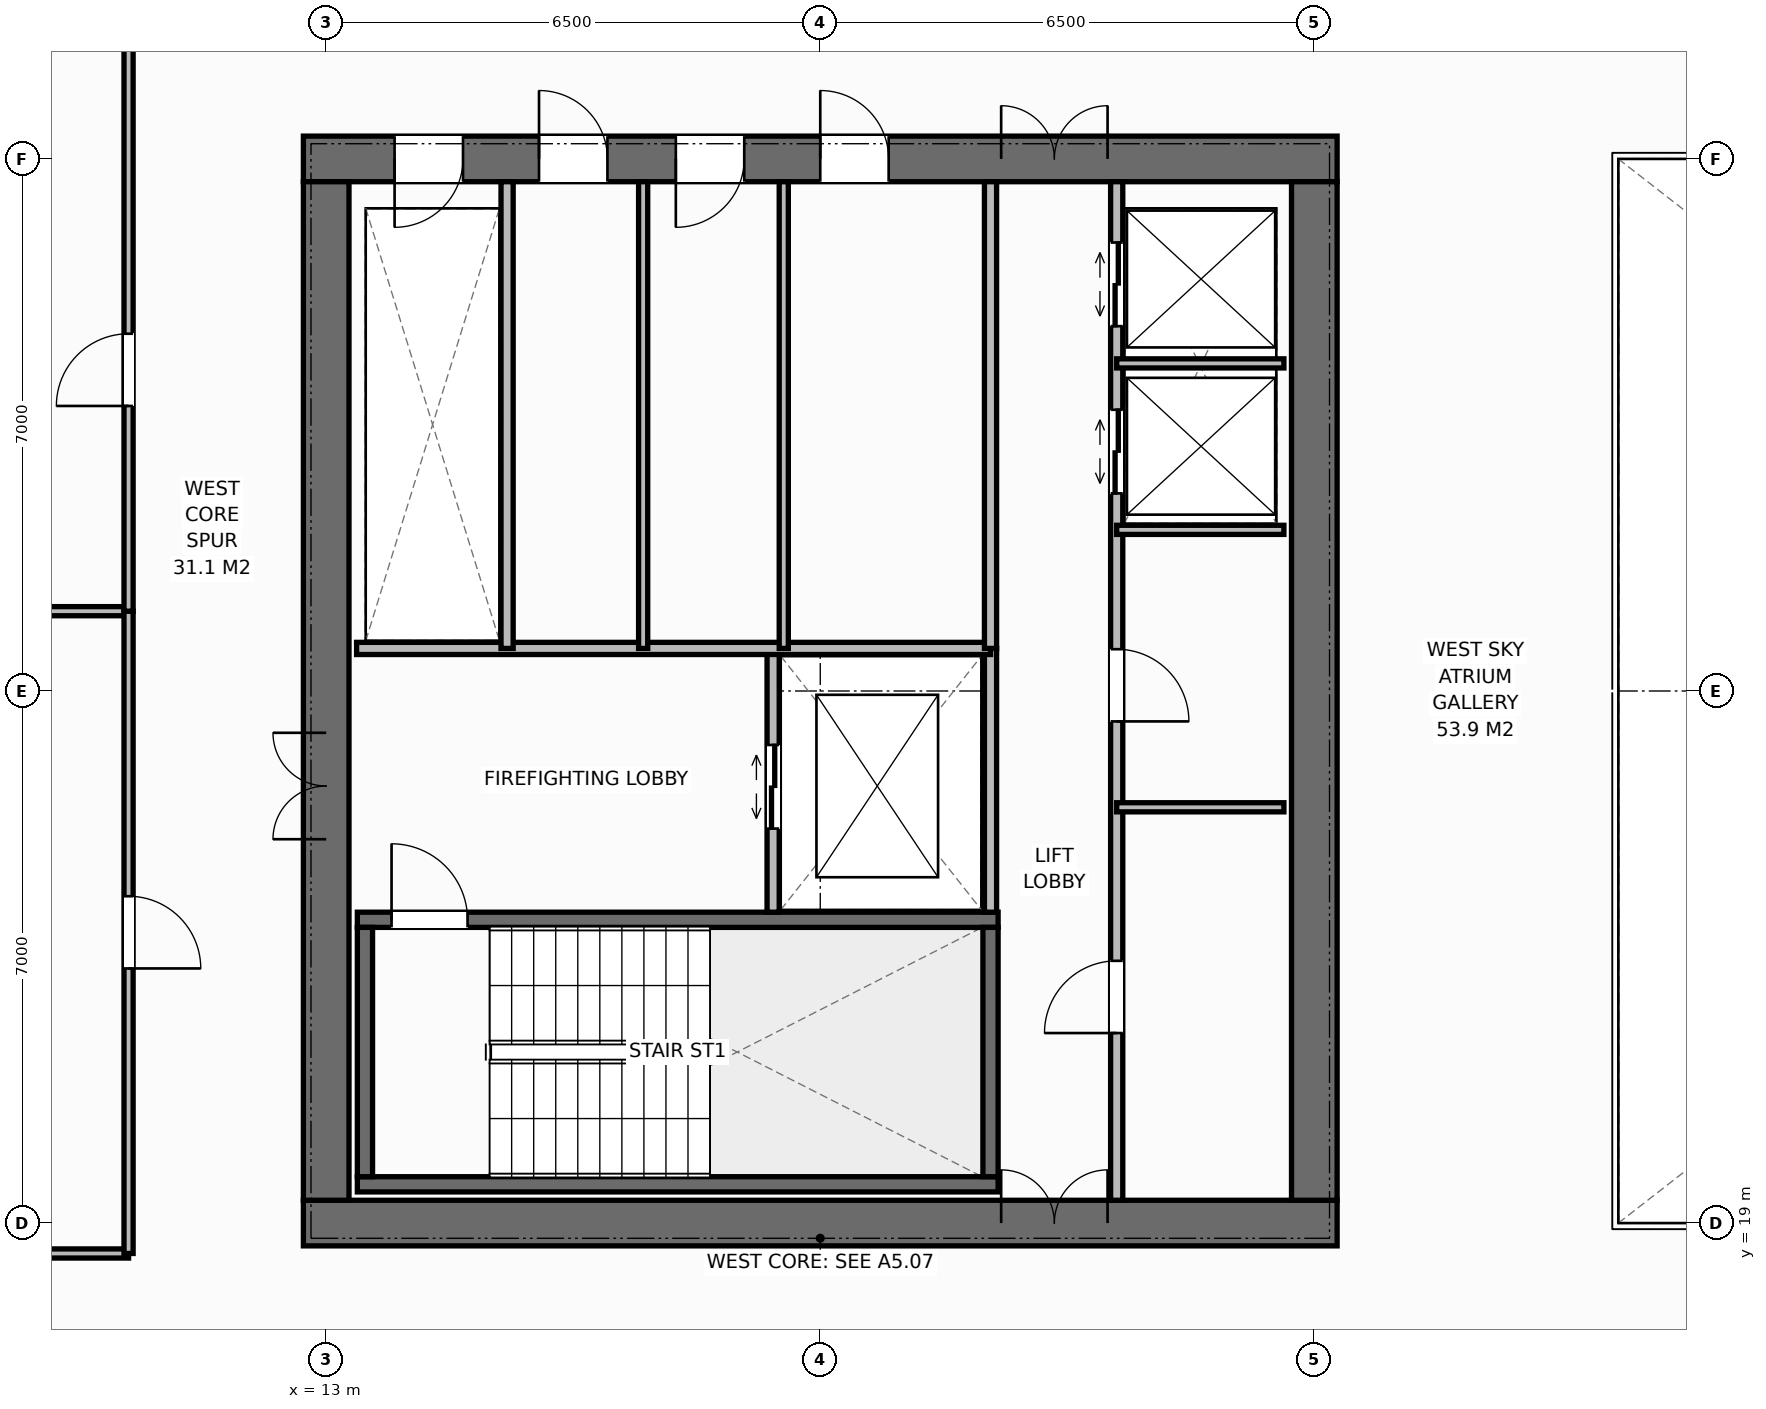
"""IFC4 building model, lengths in metres.
Left out: names, types, materials, properties, quantities, classifications, styles, units other than length and angle.
Written with IfcOpenShell. Run it as: python <this file> out.ifc"""

import sys

from ifc_helpers import new_model, si_unit, direction, frame, frame_2d, origin, place, context, subcontext, project, spatial, rectangle, extrude, element, fill, save


model = new_model("IFC4")
c1 = context("Model", 3, precision=1e-05, world=origin(), true_north=direction((0.0, 1.0)))
c2 = subcontext(c1, "Body", "Model", "MODEL_VIEW")
j1 = project(units=[si_unit("LENGTHUNIT", "METRE"), si_unit("PLANEANGLEUNIT", "RADIAN")], contexts=[c1])
p1 = place(None, origin())
s1 = spatial("IfcSite", under=j1, at=p1, CompositionType="ELEMENT")
p2 = place(p1, origin())
s2 = spatial("IfcBuilding", under=s1, at=p2, CompositionType="ELEMENT")
p3 = place(p2, frame((0.0, 0.0, 182.2)))
s3 = spatial("IfcBuildingStorey", under=s2, at=p3, CompositionType="ELEMENT", Elevation=182.2)
p4 = place(p3, frame((12.7, 19.0, 0.0), z_axis=(0.0, 0.0, 1.0), x_axis=(1.0, 0.0, 0.0)))
e1 = element("IfcWall", 1, at=p4, inside=s3, PredefinedType="SHEAR", context=c2, shape_type="SweptSolid", body=[
    extrude(rectangle(XDim=13.6, YDim=0.6, at=frame_2d((6.8, 0.0))), origin(), (0.0, 0.0, 1.0), 3.8),
])
p5 = place(p4, frame((9.18, 0.0, 0.0)))
e2 = element("IfcOpeningElement", 2, at=p5, cuts=e1, PredefinedType="OPENING", context=c2, shape_type="SweptSolid", body=[
    extrude(rectangle(XDim=1.4, YDim=2.2, at=frame_2d((0.7, 1.1))), frame((0.0, 0.31, 0.0), z_axis=(0.0, -1.0, 0.0), x_axis=(1.0, 0.0, 0.0)), (0.0, 0.0, 1.0), 0.62),
])
p6 = place(p3, frame((12.7, 33.0, 0.0), z_axis=(0.0, 0.0, 1.0), x_axis=(1.0, 0.0, 0.0)))
e3 = element("IfcWall", 3, at=p6, inside=s3, PredefinedType="SHEAR", context=c2, shape_type="SweptSolid", body=[
    extrude(rectangle(XDim=13.6, YDim=0.6, at=frame_2d((6.8, 0.0))), origin(), (0.0, 0.0, 1.0), 3.8),
])
p7 = place(p6, frame((1.2, 0.0, 0.0)))
e4 = element("IfcOpeningElement", 4, at=p7, cuts=e3, PredefinedType="OPENING", context=c2, shape_type="SweptSolid", body=[
    extrude(rectangle(XDim=0.9, YDim=2.15, at=frame_2d((0.45, 1.075))), frame((0.0, 0.31, 0.0), z_axis=(0.0, -1.0, 0.0), x_axis=(1.0, 0.0, 0.0)), (0.0, 0.0, 1.0), 0.62),
])
p8 = place(p6, frame((3.1, 0.0, 0.0)))
e5 = element("IfcOpeningElement", 5, at=p8, cuts=e3, PredefinedType="OPENING", context=c2, shape_type="SweptSolid", body=[
    extrude(rectangle(XDim=0.9, YDim=2.15, at=frame_2d((0.45, 1.075))), frame((0.0, 0.31, 0.0), z_axis=(0.0, -1.0, 0.0), x_axis=(1.0, 0.0, 0.0)), (0.0, 0.0, 1.0), 0.62),
])
p9 = place(p6, frame((4.9, 0.0, 0.0)))
e6 = element("IfcOpeningElement", 6, at=p9, cuts=e3, PredefinedType="OPENING", context=c2, shape_type="SweptSolid", body=[
    extrude(rectangle(XDim=0.9, YDim=2.15, at=frame_2d((0.45, 1.075))), frame((0.0, 0.31, 0.0), z_axis=(0.0, -1.0, 0.0), x_axis=(1.0, 0.0, 0.0)), (0.0, 0.0, 1.0), 0.62),
])
p10 = place(p6, frame((6.8, 0.0, 0.0)))
e7 = element("IfcOpeningElement", 7, at=p10, cuts=e3, PredefinedType="OPENING", context=c2, shape_type="SweptSolid", body=[
    extrude(rectangle(XDim=0.9, YDim=2.15, at=frame_2d((0.45, 1.075))), frame((0.0, 0.31, 0.0), z_axis=(0.0, -1.0, 0.0), x_axis=(1.0, 0.0, 0.0)), (0.0, 0.0, 1.0), 0.62),
])
p11 = place(p6, frame((9.18, 0.0, 0.0)))
e8 = element("IfcOpeningElement", 8, at=p11, cuts=e3, PredefinedType="OPENING", context=c2, shape_type="SweptSolid", body=[
    extrude(rectangle(XDim=1.4, YDim=2.2, at=frame_2d((0.7, 1.1))), frame((0.0, 0.31, 0.0), z_axis=(0.0, -1.0, 0.0), x_axis=(1.0, 0.0, 0.0)), (0.0, 0.0, 1.0), 0.62),
])
p12 = place(p3, frame((13.0, 19.3, 0.0), z_axis=(0.0, 0.0, 1.0), x_axis=(0.0, 1.0, 0.0)))
e9 = element("IfcWall", 9, at=p12, inside=s3, PredefinedType="SHEAR", context=c2, shape_type="SweptSolid", body=[
    extrude(rectangle(XDim=13.4, YDim=0.6, at=frame_2d((6.7, 0.0))), origin(), (0.0, 0.0, 1.0), 3.8),
])
p13 = place(p12, frame((4.75, 0.0, 0.0)))
e10 = element("IfcOpeningElement", 10, at=p13, cuts=e9, PredefinedType="OPENING", context=c2, shape_type="SweptSolid", body=[
    extrude(rectangle(XDim=1.4, YDim=2.2, at=frame_2d((0.7, 1.1))), frame((0.0, 0.31, 0.0), z_axis=(0.0, -1.0, 0.0), x_axis=(1.0, 0.0, 0.0)), (0.0, 0.0, 1.0), 0.62),
])
p14 = place(p3, frame((26.0, 19.3, 0.0), z_axis=(0.0, 0.0, 1.0), x_axis=(0.0, 1.0, 0.0)))
e11 = element("IfcWall", 11, at=p14, inside=s3, PredefinedType="SHEAR", context=c2, shape_type="SweptSolid", body=[
    extrude(rectangle(XDim=13.4, YDim=0.6, at=frame_2d((6.7, 0.0))), origin(), (0.0, 0.0, 1.0), 3.8),
])
p15 = place(p3, frame((13.41, 19.51, 0.0), z_axis=(0.0, 0.0, 1.0), x_axis=(1.0, 0.0, 0.0)))
e12 = element("IfcWall", 12, at=p15, inside=s3, PredefinedType="SHEAR", context=c2, shape_type="SweptSolid", body=[
    extrude(rectangle(XDim=8.43, YDim=0.2, at=frame_2d((4.215, 0.0))), origin(), (0.0, 0.0, 1.0), 3.8),
])
p16 = place(p3, frame((13.41, 22.99, 0.0), z_axis=(0.0, 0.0, 1.0), x_axis=(1.0, 0.0, 0.0)))
e13 = element("IfcWall", 13, at=p16, inside=s3, PredefinedType="SHEAR", context=c2, shape_type="SweptSolid", body=[
    extrude(rectangle(XDim=8.43, YDim=0.2, at=frame_2d((4.215, 0.0))), origin(), (0.0, 0.0, 1.0), 3.8),
])
p17 = place(p16, frame((0.45, 0.0, 0.0)))
e14 = element("IfcOpeningElement", 14, at=p17, cuts=e13, PredefinedType="OPENING", context=c2, shape_type="SweptSolid", body=[
    extrude(rectangle(XDim=1.0, YDim=2.15, at=frame_2d((0.5, 1.075))), frame((0.0, 0.11, 0.0), z_axis=(0.0, -1.0, 0.0), x_axis=(1.0, 0.0, 0.0)), (0.0, 0.0, 1.0), 0.22),
])
for number, where, z_axis, x_axis in (
    (15, (13.51, 19.61, 0.0), (0.0, 0.0, 1.0), (0.0, 1.0, 0.0)),
    (16, (21.74, 19.61, 0.0), (0.0, 0.0, 1.0), (0.0, 1.0, 0.0)),
):
    element("IfcWall", number, at=place(p3, frame(where, z_axis=z_axis, x_axis=x_axis)), inside=s3, PredefinedType="SHEAR", context=c2, shape_type="SweptSolid", body=[
        extrude(rectangle(XDim=3.28, YDim=0.2, at=frame_2d((1.64, 0.0))), origin(), (0.0, 0.0, 1.0), 3.8),
    ])
p18 = place(p3, frame((21.74, 23.09, 0.0), z_axis=(0.0, 0.0, 1.0), x_axis=(0.0, 1.0, 0.0)))
e17 = element("IfcWall", 17, at=p18, inside=s3, PredefinedType="STANDARD", context=c2, shape_type="SweptSolid", body=[
    extrude(rectangle(XDim=3.47, YDim=0.16, at=frame_2d((1.735, 0.0))), origin(), (0.0, 0.0, 1.0), 3.572),
])
p19 = place(p3, frame((18.88, 23.09, 0.0), z_axis=(0.0, 0.0, 1.0), x_axis=(0.0, 1.0, 0.0)))
e18 = element("IfcWall", 18, at=p19, inside=s3, PredefinedType="STANDARD", context=c2, shape_type="SweptSolid", body=[
    extrude(rectangle(XDim=3.47, YDim=0.16, at=frame_2d((1.735, 0.0))), origin(), (0.0, 0.0, 1.0), 3.572),
])
p20 = place(p19, frame((1.1, 0.0, 0.0)))
e19 = element("IfcOpeningElement", 19, at=p20, cuts=e18, PredefinedType="OPENING", context=c2, shape_type="SweptSolid", body=[
    extrude(rectangle(XDim=1.1, YDim=2.2, at=frame_2d((0.55, 1.1))), frame((0.0, 0.09, 0.0), z_axis=(0.0, -1.0, 0.0), x_axis=(1.0, 0.0, 0.0)), (0.0, 0.0, 1.0), 0.18),
])
p21 = place(p3, frame((13.4, 26.56, 0.0), z_axis=(0.0, 0.0, 1.0), x_axis=(1.0, 0.0, 0.0)))
e20 = element("IfcWall", 20, at=p21, inside=s3, PredefinedType="STANDARD", context=c2, shape_type="SweptSolid", body=[
    extrude(rectangle(XDim=8.34, YDim=0.16, at=frame_2d((4.17, 0.0))), origin(), (0.0, 0.0, 1.0), 3.572),
])
p22 = place(p3, frame((15.38, 26.56, 0.0), z_axis=(0.0, 0.0, 1.0), x_axis=(0.0, 1.0, 0.0)))
e21 = element("IfcWall", 21, at=p22, inside=s3, PredefinedType="STANDARD", context=c2, shape_type="SweptSolid", body=[
    extrude(rectangle(XDim=6.14, YDim=0.16, at=frame_2d((3.07, 0.0))), origin(), (0.0, 0.0, 1.0), 3.572),
])
for number, where, z_axis, x_axis in (
    (22, (17.17, 26.56, 0.0), (0.0, 0.0, 1.0), (0.0, 1.0, 0.0)),
    (23, (19.02, 26.56, 0.0), (0.0, 0.0, 1.0), (0.0, 1.0, 0.0)),
):
    element("IfcWall", number, at=place(p3, frame(where, z_axis=z_axis, x_axis=x_axis)), inside=s3, PredefinedType="PARTITIONING", context=c2, shape_type="SweptSolid", body=[
        extrude(rectangle(XDim=6.14, YDim=0.12, at=frame_2d((3.07, 0.0))), origin(), (0.0, 0.0, 1.0), 3.572),
    ])
p23 = place(p3, frame((21.74, 26.56, 0.0), z_axis=(0.0, 0.0, 1.0), x_axis=(0.0, 1.0, 0.0)))
e24 = element("IfcWall", 24, at=p23, inside=s3, PredefinedType="STANDARD", context=c2, shape_type="SweptSolid", body=[
    extrude(rectangle(XDim=6.14, YDim=0.16, at=frame_2d((3.07, 0.0))), origin(), (0.0, 0.0, 1.0), 3.572),
])
p24 = place(p3, frame((23.4, 19.3, 0.0), z_axis=(0.0, 0.0, 1.0), x_axis=(0.0, 1.0, 0.0)))
e25 = element("IfcWall", 25, at=p24, inside=s3, PredefinedType="STANDARD", context=c2, shape_type="SweptSolid", body=[
    extrude(rectangle(XDim=13.4, YDim=0.16, at=frame_2d((6.7, 0.0))), origin(), (0.0, 0.0, 1.0), 3.572),
])
p25 = place(p24, frame((2.2, 0.0, 0.0)))
e26 = element("IfcOpeningElement", 26, at=p25, cuts=e25, PredefinedType="OPENING", context=c2, shape_type="SweptSolid", body=[
    extrude(rectangle(XDim=0.95, YDim=2.15, at=frame_2d((0.475, 1.075))), frame((0.0, 0.09, 0.0), z_axis=(0.0, -1.0, 0.0), x_axis=(1.0, 0.0, 0.0)), (0.0, 0.0, 1.0), 0.18),
])
p26 = place(p24, frame((6.3, 0.0, 0.0)))
e27 = element("IfcOpeningElement", 27, at=p26, cuts=e25, PredefinedType="OPENING", context=c2, shape_type="SweptSolid", body=[
    extrude(rectangle(XDim=0.95, YDim=2.15, at=frame_2d((0.475, 1.075))), frame((0.0, 0.09, 0.0), z_axis=(0.0, -1.0, 0.0), x_axis=(1.0, 0.0, 0.0)), (0.0, 0.0, 1.0), 0.18),
])
p27 = place(p24, frame((9.3, 0.0, 0.0)))
e28 = element("IfcOpeningElement", 28, at=p27, cuts=e25, PredefinedType="OPENING", context=c2, shape_type="SweptSolid", body=[
    extrude(rectangle(XDim=1.1, YDim=2.2, at=frame_2d((0.55, 1.1))), frame((0.0, 0.09, 0.0), z_axis=(0.0, -1.0, 0.0), x_axis=(1.0, 0.0, 0.0)), (0.0, 0.0, 1.0), 0.18),
])
p28 = place(p24, frame((11.5, 0.0, 0.0)))
e29 = element("IfcOpeningElement", 29, at=p28, cuts=e25, PredefinedType="OPENING", context=c2, shape_type="SweptSolid", body=[
    extrude(rectangle(XDim=1.1, YDim=2.2, at=frame_2d((0.55, 1.1))), frame((0.0, 0.09, 0.0), z_axis=(0.0, -1.0, 0.0), x_axis=(1.0, 0.0, 0.0)), (0.0, 0.0, 1.0), 0.18),
])
for number, where, z_axis, x_axis in (
    (30, (23.4, 24.47, 0.0), (0.0, 0.0, 1.0), (1.0, 0.0, 0.0)),
    (31, (23.4, 28.12, 0.0), (0.0, 0.0, 1.0), (1.0, 0.0, 0.0)),
    (32, (23.4, 30.31, 0.0), (0.0, 0.0, 1.0), (1.0, 0.0, 0.0)),
):
    element("IfcWall", number, at=place(p3, frame(where, z_axis=z_axis, x_axis=x_axis)), inside=s3, PredefinedType="PARTITIONING", context=c2, shape_type="SweptSolid", body=[
        extrude(rectangle(XDim=2.2, YDim=0.12, at=frame_2d((1.1, 0.0))), origin(), (0.0, 0.0, 1.0), 3.572),
    ])
for number, where, z_axis, x_axis in (
    (33, (3.82, 18.6, 0.0), (0.0, 0.0, 1.0), (1.0, 0.0, 0.0)),
    (34, (3.82, 27.05, 0.0), (0.0, 0.0, 1.0), (1.0, 0.0, 0.0)),
):
    element("IfcWall", number, at=place(p3, frame(where, z_axis=z_axis, x_axis=x_axis)), inside=s3, PredefinedType="PARTITIONING", context=c2, shape_type="SweptSolid", body=[
        extrude(rectangle(XDim=6.58, YDim=0.12, at=frame_2d((3.29, 0.0))), origin(), (0.0, 0.0, 1.0), 3.572),
    ])
p29 = place(p3, frame((10.4, 18.6, 0.0), z_axis=(0.0, 0.0, 1.0), x_axis=(0.0, 1.0, 0.0)))
e35 = element("IfcWall", 35, at=p29, inside=s3, PredefinedType="PARTITIONING", context=c2, shape_type="SweptSolid", body=[
    extrude(rectangle(XDim=8.45, YDim=0.12, at=frame_2d((4.225, 0.0))), origin(), (0.0, 0.0, 1.0), 3.572),
])
p30 = place(p29, frame((3.75, 0.0, 0.0)))
e36 = element("IfcOpeningElement", 36, at=p30, cuts=e35, PredefinedType="OPENING", context=c2, shape_type="SweptSolid", body=[
    extrude(rectangle(XDim=0.95, YDim=2.15, at=frame_2d((0.475, 1.075))), frame((0.0, 0.07, 0.0), z_axis=(0.0, -1.0, 0.0), x_axis=(1.0, 0.0, 0.0)), (0.0, 0.0, 1.0), 0.14),
])
p31 = place(p3, frame((10.4, 27.05, 0.0), z_axis=(0.0, 0.0, 1.0), x_axis=(0.0, 1.0, 0.0)))
e37 = element("IfcWall", 37, at=p31, inside=s3, PredefinedType="PARTITIONING", context=c2, shape_type="SweptSolid", body=[
    extrude(rectangle(XDim=8.45, YDim=0.12, at=frame_2d((4.225, 0.0))), origin(), (0.0, 0.0, 1.0), 3.572),
])
p32 = place(p31, frame((2.7, 0.0, 0.0)))
e38 = element("IfcOpeningElement", 38, at=p32, cuts=e37, PredefinedType="OPENING", context=c2, shape_type="SweptSolid", body=[
    extrude(rectangle(XDim=0.95, YDim=2.15, at=frame_2d((0.475, 1.075))), frame((0.0, 0.07, 0.0), z_axis=(0.0, -1.0, 0.0), x_axis=(1.0, 0.0, 0.0)), (0.0, 0.0, 1.0), 0.14),
])
p33 = place(p17, origin())
e39 = element("IfcDoor", 39, at=p33, inside=s3, OperationType="SINGLE_SWING_LEFT", PredefinedType="DOOR", context=c2, shape_type="SweptSolid", body=[
    extrude(rectangle(XDim=1.0, YDim=2.15, at=frame_2d((0.5, 1.075))), frame((0.0, 0.025, 0.0), z_axis=(0.0, -1.0, 0.0), x_axis=(1.0, 0.0, 0.0)), (0.0, 0.0, 1.0), 0.05),
])
fill(e14, e39)
p34 = place(p13, origin())
e40 = element("IfcDoor", 40, at=p34, inside=s3, OperationType="DOUBLE_DOOR_SINGLE_SWING", PredefinedType="DOOR", context=c2, shape_type="SweptSolid", body=[
    extrude(rectangle(XDim=1.4, YDim=2.2, at=frame_2d((0.7, 1.1))), frame((0.0, 0.025, 0.0), z_axis=(0.0, -1.0, 0.0), x_axis=(1.0, 0.0, 0.0)), (0.0, 0.0, 1.0), 0.05),
])
fill(e10, e40)
p35 = place(p20, origin())
e41 = element("IfcDoor", 41, at=p35, inside=s3, OperationType="DOUBLE_DOOR_SLIDING", PredefinedType="DOOR", context=c2, shape_type="SweptSolid", body=[
    extrude(rectangle(XDim=1.1, YDim=2.2, at=frame_2d((0.55, 1.1))), frame((0.0, 0.025, 0.0), z_axis=(0.0, -1.0, 0.0), x_axis=(1.0, 0.0, 0.0)), (0.0, 0.0, 1.0), 0.05),
])
fill(e19, e41)
p36 = place(p7, origin())
e42 = element("IfcDoor", 42, at=p36, inside=s3, OperationType="SINGLE_SWING_RIGHT", PredefinedType="DOOR", context=c2, shape_type="SweptSolid", body=[
    extrude(rectangle(XDim=0.9, YDim=2.15, at=frame_2d((0.45, 1.075))), frame((0.0, -0.025, 0.0), z_axis=(0.0, -1.0, 0.0), x_axis=(1.0, 0.0, 0.0)), (0.0, 0.0, 1.0), 0.05),
])
fill(e4, e42)
p37 = place(p8, origin())
e43 = element("IfcDoor", 43, at=p37, inside=s3, OperationType="SINGLE_SWING_LEFT", PredefinedType="DOOR", context=c2, shape_type="SweptSolid", body=[
    extrude(rectangle(XDim=0.9, YDim=2.15, at=frame_2d((0.45, 1.075))), frame((0.0, -0.025, 0.0), z_axis=(0.0, -1.0, 0.0), x_axis=(1.0, 0.0, 0.0)), (0.0, 0.0, 1.0), 0.05),
])
fill(e5, e43)
p38 = place(p9, origin())
e44 = element("IfcDoor", 44, at=p38, inside=s3, OperationType="SINGLE_SWING_RIGHT", PredefinedType="DOOR", context=c2, shape_type="SweptSolid", body=[
    extrude(rectangle(XDim=0.9, YDim=2.15, at=frame_2d((0.45, 1.075))), frame((0.0, -0.025, 0.0), z_axis=(0.0, -1.0, 0.0), x_axis=(1.0, 0.0, 0.0)), (0.0, 0.0, 1.0), 0.05),
])
fill(e6, e44)
p39 = place(p10, origin())
e45 = element("IfcDoor", 45, at=p39, inside=s3, OperationType="SINGLE_SWING_LEFT", PredefinedType="DOOR", context=c2, shape_type="SweptSolid", body=[
    extrude(rectangle(XDim=0.9, YDim=2.15, at=frame_2d((0.45, 1.075))), frame((0.0, -0.025, 0.0), z_axis=(0.0, -1.0, 0.0), x_axis=(1.0, 0.0, 0.0)), (0.0, 0.0, 1.0), 0.05),
])
fill(e7, e45)
p40 = place(p5, origin())
e46 = element("IfcDoor", 46, at=p40, inside=s3, OperationType="DOUBLE_DOOR_SINGLE_SWING", PredefinedType="DOOR", context=c2, shape_type="SweptSolid", body=[
    extrude(rectangle(XDim=1.4, YDim=2.2, at=frame_2d((0.7, 1.1))), frame((0.0, 0.075, 0.0), z_axis=(0.0, -1.0, 0.0), x_axis=(1.0, 0.0, 0.0)), (0.0, 0.0, 1.0), 0.05),
])
fill(e2, e46)
p41 = place(p11, origin())
e47 = element("IfcDoor", 47, at=p41, inside=s3, OperationType="DOUBLE_DOOR_SINGLE_SWING", PredefinedType="DOOR", context=c2, shape_type="SweptSolid", body=[
    extrude(rectangle(XDim=1.4, YDim=2.2, at=frame_2d((0.7, 1.1))), frame((0.0, -0.025, 0.0), z_axis=(0.0, -1.0, 0.0), x_axis=(1.0, 0.0, 0.0)), (0.0, 0.0, 1.0), 0.05),
])
fill(e8, e47)
p42 = place(p25, origin())
e48 = element("IfcDoor", 48, at=p42, inside=s3, OperationType="SINGLE_SWING_LEFT", PredefinedType="DOOR", context=c2, shape_type="SweptSolid", body=[
    extrude(rectangle(XDim=0.95, YDim=2.15, at=frame_2d((0.475, 1.075))), frame((0.0, 0.025, 0.0), z_axis=(0.0, -1.0, 0.0), x_axis=(1.0, 0.0, 0.0)), (0.0, 0.0, 1.0), 0.05),
])
fill(e26, e48)
p43 = place(p26, origin())
e49 = element("IfcDoor", 49, at=p43, inside=s3, OperationType="SINGLE_SWING_RIGHT", PredefinedType="DOOR", context=c2, shape_type="SweptSolid", body=[
    extrude(rectangle(XDim=0.95, YDim=2.15, at=frame_2d((0.475, 1.075))), frame((0.0, 0.025, 0.0), z_axis=(0.0, -1.0, 0.0), x_axis=(1.0, 0.0, 0.0)), (0.0, 0.0, 1.0), 0.05),
])
fill(e27, e49)
p44 = place(p27, origin())
e50 = element("IfcDoor", 50, at=p44, inside=s3, OperationType="DOUBLE_DOOR_SLIDING", PredefinedType="DOOR", context=c2, shape_type="SweptSolid", body=[
    extrude(rectangle(XDim=1.1, YDim=2.2, at=frame_2d((0.55, 1.1))), frame((0.0, 0.025, 0.0), z_axis=(0.0, -1.0, 0.0), x_axis=(1.0, 0.0, 0.0)), (0.0, 0.0, 1.0), 0.05),
])
fill(e28, e50)
p45 = place(p28, origin())
e51 = element("IfcDoor", 51, at=p45, inside=s3, OperationType="DOUBLE_DOOR_SLIDING", PredefinedType="DOOR", context=c2, shape_type="SweptSolid", body=[
    extrude(rectangle(XDim=1.1, YDim=2.2, at=frame_2d((0.55, 1.1))), frame((0.0, 0.025, 0.0), z_axis=(0.0, -1.0, 0.0), x_axis=(1.0, 0.0, 0.0)), (0.0, 0.0, 1.0), 0.05),
])
fill(e29, e51)
p46 = place(p30, origin())
e52 = element("IfcDoor", 52, at=p46, inside=s3, OperationType="SINGLE_SWING_RIGHT", PredefinedType="DOOR", context=c2, shape_type="SweptSolid", body=[
    extrude(rectangle(XDim=0.95, YDim=2.15, at=frame_2d((0.475, 1.075))), frame((0.0, 0.025, 0.0), z_axis=(0.0, -1.0, 0.0), x_axis=(1.0, 0.0, 0.0)), (0.0, 0.0, 1.0), 0.05),
])
fill(e36, e52)
p47 = place(p32, origin())
e53 = element("IfcDoor", 53, at=p47, inside=s3, OperationType="SINGLE_SWING_LEFT", PredefinedType="DOOR", context=c2, shape_type="SweptSolid", body=[
    extrude(rectangle(XDim=0.95, YDim=2.15, at=frame_2d((0.475, 1.075))), frame((0.0, 0.025, 0.0), z_axis=(0.0, -1.0, 0.0), x_axis=(1.0, 0.0, 0.0)), (0.0, 0.0, 1.0), 0.05),
])
fill(e38, e53)
save(model, sys.argv[1])
